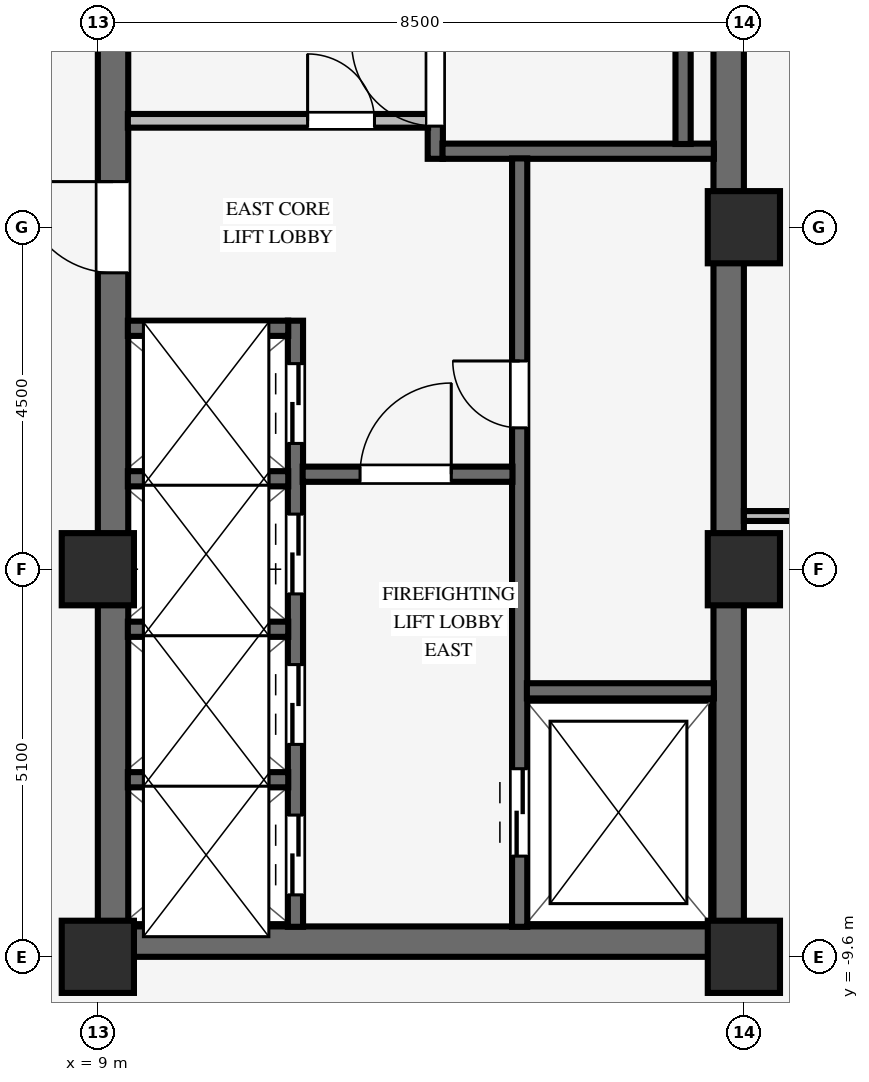
"""IFC4 building model, lengths in metres.
Left out: names, types, materials, properties, quantities, classifications, styles, units other than length and angle.
Written with IfcOpenShell. Run it as: python <this file> out.ifc"""

import sys

from ifc_helpers import new_model, si_unit, direction, frame, frame_2d, origin, origin_2d, place, context, subcontext, project, spatial, rectangle, extrude, source, transform, mapped, element, fill, save


model = new_model("IFC4")
c1 = context("Model", 3, precision=1e-05, world=origin(), true_north=direction((0.0, 1.0)))
c2 = subcontext(c1, "Body", "Model", "MODEL_VIEW")
j1 = project(units=[si_unit("LENGTHUNIT", "METRE"), si_unit("PLANEANGLEUNIT", "RADIAN")], contexts=[c1])
p1 = place(None, origin())
s1 = spatial("IfcSite", under=j1, at=p1, CompositionType="ELEMENT")
p2 = place(p1, origin())
s2 = spatial("IfcBuilding", under=s1, at=p2, CompositionType="ELEMENT")
p3 = place(p2, frame((0.0, 0.0, 127.5)))
s3 = spatial("IfcBuildingStorey", under=s2, at=p3, CompositionType="ELEMENT", Elevation=127.5)
p4 = place(p3, frame((9.0, -9.4, 0.0), z_axis=(0.0, 0.0, 1.0), x_axis=(1.0, 0.0, 0.0)))
e1 = element("IfcWall", 1, at=p4, inside=s3, PredefinedType="SHEAR", context=c2, shape_type="SweptSolid", body=[
    extrude(rectangle(XDim=8.5, YDim=0.4, at=frame_2d((4.25, 0.0))), origin(), (0.0, 0.0, 1.0), 3.37),
])
p5 = place(p3, frame((9.2, -9.205, 0.0), z_axis=(0.0, 0.0, 1.0), x_axis=(0.0, 1.0, 0.0)))
e2 = element("IfcWall", 2, at=p5, inside=s3, PredefinedType="SHEAR", context=c2, shape_type="SweptSolid", body=[
    extrude(rectangle(XDim=18.41, YDim=0.4, at=frame_2d((9.205, 0.0))), origin(), (0.0, 0.0, 1.0), 3.37),
])
p6 = place(p5, frame((8.605, 0.0, 0.0)))
e3 = element("IfcOpeningElement", 3, at=p6, cuts=e2, PredefinedType="OPENING", context=c2, shape_type="SweptSolid", body=[
    extrude(rectangle(XDim=1.2, YDim=2.15, at=frame_2d((0.6, 1.075))), frame((0.0, 0.21, 0.0), z_axis=(0.0, -1.0, 0.0), x_axis=(1.0, 0.0, 0.0)), (0.0, 0.0, 1.0), 0.42),
])
p7 = place(p3, frame((17.3, -9.205, 0.0), z_axis=(0.0, 0.0, 1.0), x_axis=(0.0, 1.0, 0.0)))
e4 = element("IfcWall", 4, at=p7, inside=s3, PredefinedType="SHEAR", context=c2, shape_type="SweptSolid", body=[
    extrude(rectangle(XDim=18.41, YDim=0.4, at=frame_2d((9.205, 0.0))), origin(), (0.0, 0.0, 1.0), 3.37),
])
for number, where, z_axis, x_axis in (
    (5, (9.0, -9.6, 0.0), (0.0, 0.0, 1.0), (1.0, 0.0, 0.0)),
    (6, (9.0, -4.5, 0.0), (0.0, 0.0, 1.0), (1.0, 0.0, 0.0)),
    (7, (17.5, -9.6, 0.0), (0.0, 0.0, 1.0), (1.0, 0.0, 0.0)),
    (8, (17.5, -4.5, 0.0), (0.0, 0.0, 1.0), (1.0, 0.0, 0.0)),
    (9, (17.5, 0.0, 0.0), (0.0, 0.0, 1.0), (1.0, 0.0, 0.0)),
):
    element("IfcColumn", number, at=place(p3, frame(where, z_axis=z_axis, x_axis=x_axis)), inside=s3, PredefinedType="COLUMN", context=c2, shape_type="SweptSolid", body=[
        extrude(rectangle(XDim=0.95, YDim=0.95, at=origin_2d()), origin(), (0.0, 0.0, 1.0), 3.37),
    ])
p8 = place(p3, frame((13.44, 0.9, 0.0), z_axis=(0.0, 0.0, 1.0), x_axis=(0.0, 1.0, 0.0)))
e10 = element("IfcWall", 10, at=p8, inside=s3, PredefinedType="SHEAR", context=c2, shape_type="SweptSolid", body=[
    extrude(rectangle(XDim=8.305, YDim=0.2, at=frame_2d((4.153, 0.0))), origin(), (0.0, 0.0, 1.0), 3.37),
])
p9 = place(p8, frame((0.43, 0.0, 0.0)))
e11 = element("IfcOpeningElement", 11, at=p9, cuts=e10, PredefinedType="OPENING", context=c2, shape_type="SweptSolid", body=[
    extrude(rectangle(XDim=1.1, YDim=2.15, at=frame_2d((0.55, 1.075))), frame((0.0, 0.11, 0.0), z_axis=(0.0, -1.0, 0.0), x_axis=(1.0, 0.0, 0.0)), (0.0, 0.0, 1.0), 0.22),
])
p10 = place(p3, frame((13.535, 1.0, 0.0), z_axis=(0.0, 0.0, 1.0), x_axis=(1.0, 0.0, 0.0)))
e12 = element("IfcWall", 12, at=p10, inside=s3, PredefinedType="SHEAR", context=c2, shape_type="SweptSolid", body=[
    extrude(rectangle(XDim=3.57, YDim=0.2, at=frame_2d((1.785, 0.0))), origin(), (0.0, 0.0, 1.0), 3.37),
])
p11 = place(p3, frame((16.7, 1.095, 0.0), z_axis=(0.0, 0.0, 1.0), x_axis=(0.0, 1.0, 0.0)))
e13 = element("IfcWall", 13, at=p11, inside=s3, PredefinedType="SHEAR", context=c2, shape_type="SweptSolid", body=[
    extrude(rectangle(XDim=8.11, YDim=0.2, at=frame_2d((4.055, 0.0))), origin(), (0.0, 0.0, 1.0), 3.37),
])
p12 = place(p3, frame((14.55, -9.205, 0.0), z_axis=(0.0, 0.0, 1.0), x_axis=(0.0, 1.0, 0.0)))
e14 = element("IfcWall", 14, at=p12, inside=s3, PredefinedType="SHEAR", context=c2, shape_type="SweptSolid", body=[
    extrude(rectangle(XDim=10.11, YDim=0.2, at=frame_2d((5.055, 0.0))), origin(), (0.0, 0.0, 1.0), 3.37),
])
p13 = place(p12, frame((6.565, 0.0, 0.0)))
e15 = element("IfcOpeningElement", 15, at=p13, cuts=e14, PredefinedType="OPENING", context=c2, shape_type="SweptSolid", body=[
    extrude(rectangle(XDim=0.88, YDim=2.1, at=frame_2d((0.44, 1.05))), frame((0.0, 0.11, 0.0), z_axis=(0.0, -1.0, 0.0), x_axis=(1.0, 0.0, 0.0)), (0.0, 0.0, 1.0), 0.22),
])
p14 = place(p12, frame((0.93, 0.0, 0.0)))
e16 = element("IfcOpeningElement", 16, at=p14, cuts=e14, PredefinedType="OPENING", context=c2, shape_type="SweptSolid", body=[
    extrude(rectangle(XDim=1.15, YDim=2.15, at=frame_2d((0.575, 1.075))), frame((0.0, 0.11, 0.0), z_axis=(0.0, -1.0, 0.0), x_axis=(1.0, 0.0, 0.0)), (0.0, 0.0, 1.0), 0.22),
])
p15 = place(p3, frame((14.645, -6.1, 0.0), z_axis=(0.0, 0.0, 1.0), x_axis=(1.0, 0.0, 0.0)))
e17 = element("IfcWall", 17, at=p15, inside=s3, PredefinedType="SHEAR", context=c2, shape_type="SweptSolid", body=[
    extrude(rectangle(XDim=2.46, YDim=0.2, at=frame_2d((1.23, 0.0))), origin(), (0.0, 0.0, 1.0), 3.37),
])
p16 = place(p3, frame((11.6, -9.205, 0.0), z_axis=(0.0, 0.0, 1.0), x_axis=(0.0, 1.0, 0.0)))
e18 = element("IfcWall", 18, at=p16, inside=s3, PredefinedType="SHEAR", context=c2, shape_type="SweptSolid", body=[
    extrude(rectangle(XDim=7.975, YDim=0.2, at=frame_2d((3.988, 0.0))), origin(), (0.0, 0.0, 1.0), 3.37),
])
p17 = place(p16, frame((0.42, 0.0, 0.0)))
e19 = element("IfcOpeningElement", 19, at=p17, cuts=e18, PredefinedType="OPENING", context=c2, shape_type="SweptSolid", body=[
    extrude(rectangle(XDim=1.05, YDim=2.15, at=frame_2d((0.525, 1.075))), frame((0.0, 0.11, 0.0), z_axis=(0.0, -1.0, 0.0), x_axis=(1.0, 0.0, 0.0)), (0.0, 0.0, 1.0), 0.22),
])
p18 = place(p16, frame((2.4, 0.0, 0.0)))
e20 = element("IfcOpeningElement", 20, at=p18, cuts=e18, PredefinedType="OPENING", context=c2, shape_type="SweptSolid", body=[
    extrude(rectangle(XDim=1.05, YDim=2.15, at=frame_2d((0.525, 1.075))), frame((0.0, 0.11, 0.0), z_axis=(0.0, -1.0, 0.0), x_axis=(1.0, 0.0, 0.0)), (0.0, 0.0, 1.0), 0.22),
])
p19 = place(p16, frame((4.38, 0.0, 0.0)))
e21 = element("IfcOpeningElement", 21, at=p19, cuts=e18, PredefinedType="OPENING", context=c2, shape_type="SweptSolid", body=[
    extrude(rectangle(XDim=1.05, YDim=2.15, at=frame_2d((0.525, 1.075))), frame((0.0, 0.11, 0.0), z_axis=(0.0, -1.0, 0.0), x_axis=(1.0, 0.0, 0.0)), (0.0, 0.0, 1.0), 0.22),
])
p20 = place(p16, frame((6.36, 0.0, 0.0)))
e22 = element("IfcOpeningElement", 22, at=p20, cuts=e18, PredefinedType="OPENING", context=c2, shape_type="SweptSolid", body=[
    extrude(rectangle(XDim=1.05, YDim=2.15, at=frame_2d((0.525, 1.075))), frame((0.0, 0.11, 0.0), z_axis=(0.0, -1.0, 0.0), x_axis=(1.0, 0.0, 0.0)), (0.0, 0.0, 1.0), 0.22),
])
p21 = place(p3, frame((11.695, -3.25, 0.0), z_axis=(0.0, 0.0, 1.0), x_axis=(1.0, 0.0, 0.0)))
e23 = element("IfcWall", 23, at=p21, inside=s3, PredefinedType="SHEAR", context=c2, shape_type="SweptSolid", body=[
    extrude(rectangle(XDim=2.76, YDim=0.2, at=frame_2d((1.38, 0.0))), origin(), (0.0, 0.0, 1.0), 3.37),
])
p22 = place(p21, frame((0.755, 0.0, 0.0)))
e24 = element("IfcOpeningElement", 24, at=p22, cuts=e23, PredefinedType="OPENING", context=c2, shape_type="SweptSolid", body=[
    extrude(rectangle(XDim=1.2, YDim=2.15, at=frame_2d((0.6, 1.075))), frame((0.0, 0.11, 0.0), z_axis=(0.0, -1.0, 0.0), x_axis=(1.0, 0.0, 0.0)), (0.0, 0.0, 1.0), 0.22),
])
for number, where, z_axis, x_axis in (
    (25, (9.395, -7.27, 0.0), (0.0, 0.0, 1.0), (1.0, 0.0, 0.0)),
    (26, (9.395, -5.29, 0.0), (0.0, 0.0, 1.0), (1.0, 0.0, 0.0)),
    (27, (9.395, -3.31, 0.0), (0.0, 0.0, 1.0), (1.0, 0.0, 0.0)),
    (28, (9.395, -1.33, 0.0), (0.0, 0.0, 1.0), (1.0, 0.0, 0.0)),
):
    element("IfcWall", number, at=place(p3, frame(where, z_axis=z_axis, x_axis=x_axis)), inside=s3, PredefinedType="SHEAR", context=c2, shape_type="SweptSolid", body=[
        extrude(rectangle(XDim=2.11, YDim=0.2, at=frame_2d((1.055, 0.0))), origin(), (0.0, 0.0, 1.0), 3.37),
    ])
p23 = place(p3, frame((9.395, 1.4, 0.0), z_axis=(0.0, 0.0, 1.0), x_axis=(1.0, 0.0, 0.0)))
e29 = element("IfcWall", 29, at=p23, inside=s3, PredefinedType="PARTITIONING", context=c2, shape_type="SweptSolid", body=[
    extrude(rectangle(XDim=3.95, YDim=0.18, at=frame_2d((1.975, 0.0))), origin(), (0.0, 0.0, 1.0), 3.36),
])
p24 = place(p23, frame((2.365, 0.0, 0.0)))
e30 = element("IfcOpeningElement", 30, at=p24, cuts=e29, PredefinedType="OPENING", context=c2, shape_type="SweptSolid", body=[
    extrude(rectangle(XDim=0.88, YDim=2.1, at=frame_2d((0.44, 1.05))), frame((0.0, 0.1, 0.0), z_axis=(0.0, -1.0, 0.0), x_axis=(1.0, 0.0, 0.0)), (0.0, 0.0, 1.0), 0.2),
])
p25 = place(p3, frame((17.5, -3.8, 0.0), z_axis=(0.0, 0.0, 1.0), x_axis=(1.0, 0.0, 0.0)))
e31 = element("IfcWall", 31, at=p25, inside=s3, PredefinedType="PARTITIONING", context=c2, shape_type="SweptSolid", body=[
    extrude(rectangle(XDim=8.58, YDim=0.13, at=frame_2d((4.29, 0.0))), origin(), (0.0, 0.0, 1.0), 3.36),
])
m1 = source(origin(), c2, "Body", "SweptSolid", [
    extrude(rectangle(XDim=1.1, YDim=2.15, at=frame_2d((0.55, 1.075))), frame((0.0, 0.025, 0.0), z_axis=(0.0, -1.0, 0.0), x_axis=(1.0, 0.0, 0.0)), (0.0, 0.0, 1.0), 0.05),
])
p26 = place(p9, origin())
e32 = element("IfcDoor", 32, at=p26, inside=s3, OperationType="SINGLE_SWING_RIGHT", PredefinedType="DOOR", context=c2, shape_type="MappedRepresentation", body=[
    mapped(m1, transform((0.0, 0.0, 0.0), scale=1.0)),
])
fill(e11, e32)
m2 = source(origin(), c2, "Body", "SweptSolid", [
    extrude(rectangle(XDim=0.88, YDim=2.1, at=frame_2d((0.44, 1.05))), frame((0.0, 0.025, 0.0), z_axis=(0.0, -1.0, 0.0), x_axis=(1.0, 0.0, 0.0)), (0.0, 0.0, 1.0), 0.05),
])
p27 = place(p13, origin())
e33 = element("IfcDoor", 33, at=p27, inside=s3, OperationType="SINGLE_SWING_RIGHT", PredefinedType="DOOR", context=c2, shape_type="MappedRepresentation", body=[
    mapped(m2, transform((0.0, 0.0, 0.0), scale=1.0)),
])
fill(e15, e33)
m3 = source(origin(), c2, "Body", "SweptSolid", [
    extrude(rectangle(XDim=1.2, YDim=2.15, at=frame_2d((0.6, 1.075))), frame((0.0, 0.025, 0.0), z_axis=(0.0, -1.0, 0.0), x_axis=(1.0, 0.0, 0.0)), (0.0, 0.0, 1.0), 0.05),
])
p28 = place(p22, origin())
e34 = element("IfcDoor", 34, at=p28, inside=s3, OperationType="SINGLE_SWING_RIGHT", PredefinedType="DOOR", context=c2, shape_type="MappedRepresentation", body=[
    mapped(m3, transform((0.0, 0.0, 0.0), scale=1.0)),
])
fill(e24, e34)
p29 = place(p6, origin())
e35 = element("IfcDoor", 35, at=p29, inside=s3, OperationType="SINGLE_SWING_RIGHT", PredefinedType="DOOR", context=c2, shape_type="MappedRepresentation", body=[
    mapped(m3, transform((0.0, 0.0, 0.0), scale=1.0)),
])
fill(e3, e35)
p30 = place(p24, origin())
e36 = element("IfcDoor", 36, at=p30, inside=s3, OperationType="SINGLE_SWING_LEFT", PredefinedType="DOOR", context=c2, shape_type="MappedRepresentation", body=[
    mapped(m2, transform((0.0, 0.0, 0.0), scale=1.0)),
])
fill(e30, e36)
m4 = source(origin(), c2, "Body", "SweptSolid", [
    extrude(rectangle(XDim=1.15, YDim=2.15, at=frame_2d((0.575, 1.075))), frame((0.0, 0.025, 0.0), z_axis=(0.0, -1.0, 0.0), x_axis=(1.0, 0.0, 0.0)), (0.0, 0.0, 1.0), 0.05),
])
p31 = place(p14, origin())
e37 = element("IfcDoor", 37, at=p31, inside=s3, OperationType="DOUBLE_DOOR_SLIDING", PredefinedType="DOOR", context=c2, shape_type="MappedRepresentation", body=[
    mapped(m4, transform((0.0, 0.0, 0.0), scale=1.0)),
])
fill(e16, e37)
m5 = source(origin(), c2, "Body", "SweptSolid", [
    extrude(rectangle(XDim=1.05, YDim=2.15, at=frame_2d((0.525, 1.075))), frame((0.0, 0.025, 0.0), z_axis=(0.0, -1.0, 0.0), x_axis=(1.0, 0.0, 0.0)), (0.0, 0.0, 1.0), 0.05),
])
p32 = place(p17, origin())
e38 = element("IfcDoor", 38, at=p32, inside=s3, OperationType="DOUBLE_DOOR_SLIDING", PredefinedType="DOOR", context=c2, shape_type="MappedRepresentation", body=[
    mapped(m5, transform((0.0, 0.0, 0.0), scale=1.0)),
])
fill(e19, e38)
p33 = place(p18, origin())
e39 = element("IfcDoor", 39, at=p33, inside=s3, OperationType="DOUBLE_DOOR_SLIDING", PredefinedType="DOOR", context=c2, shape_type="MappedRepresentation", body=[
    mapped(m5, transform((0.0, 0.0, 0.0), scale=1.0)),
])
fill(e20, e39)
p34 = place(p19, origin())
e40 = element("IfcDoor", 40, at=p34, inside=s3, OperationType="DOUBLE_DOOR_SLIDING", PredefinedType="DOOR", context=c2, shape_type="MappedRepresentation", body=[
    mapped(m5, transform((0.0, 0.0, 0.0), scale=1.0)),
])
fill(e21, e40)
p35 = place(p20, origin())
e41 = element("IfcDoor", 41, at=p35, inside=s3, OperationType="DOUBLE_DOOR_SLIDING", PredefinedType="DOOR", context=c2, shape_type="MappedRepresentation", body=[
    mapped(m5, transform((0.0, 0.0, 0.0), scale=1.0)),
])
fill(e22, e41)
save(model, sys.argv[1])
